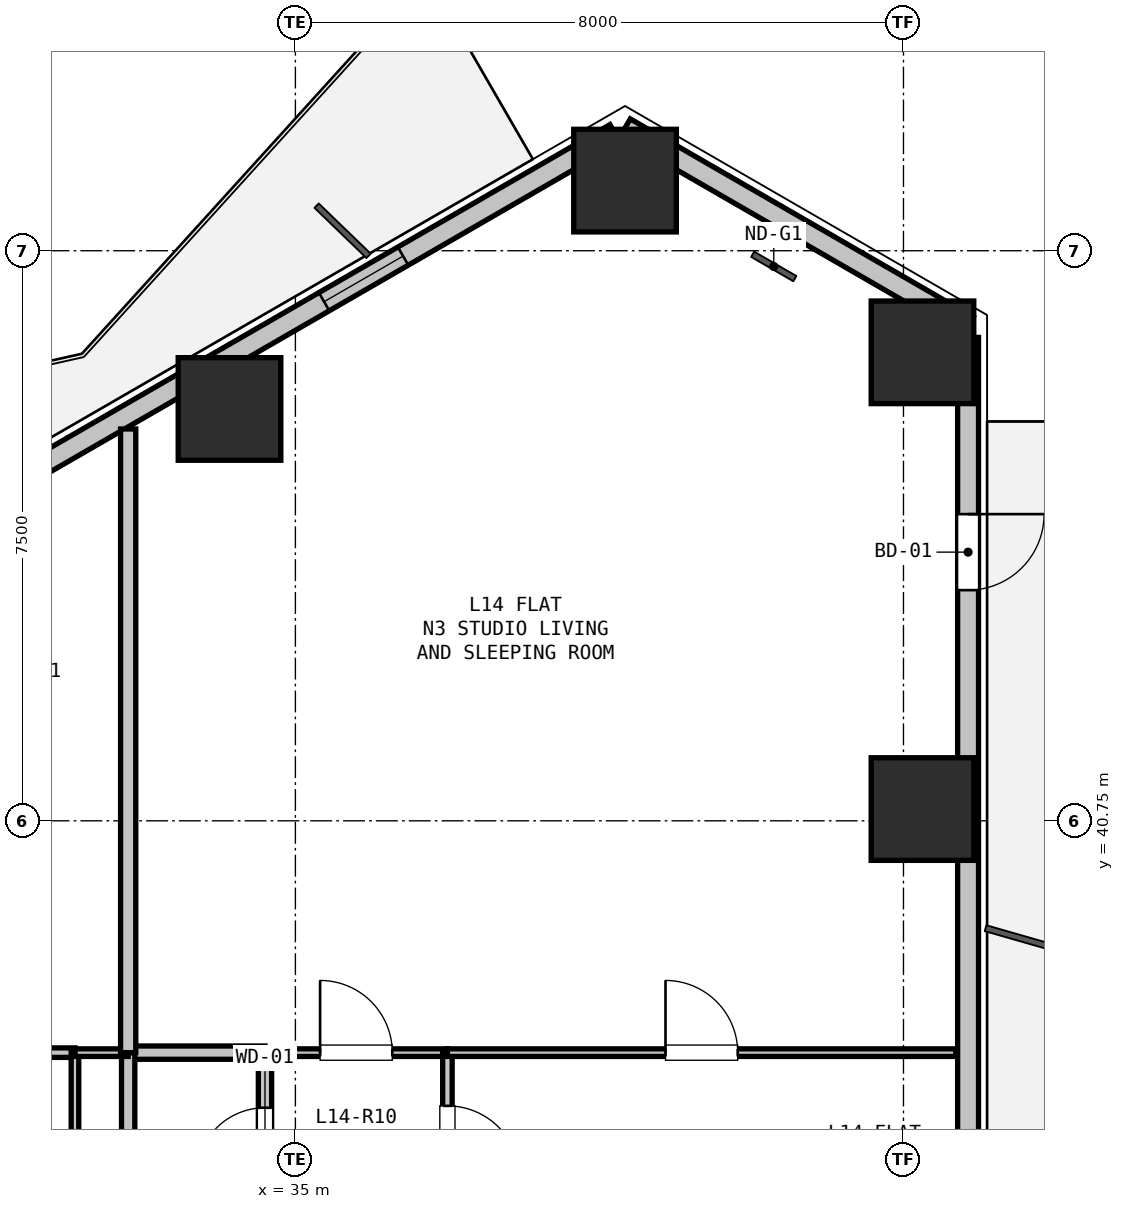
"""IFC4 building model, lengths in metres.
Left out: names, types, materials, properties, quantities, classifications, styles, units other than length and angle.
Written with IfcOpenShell. Run it as: python <this file> out.ifc"""

import sys

from ifc_helpers import new_model, si_unit, direction, frame, frame_2d, origin, origin_2d, place, context, subcontext, project, spatial, rectangle, hollow_rectangle, extrude, element, fill, save


model = new_model("IFC4")
c1 = context("Model", 3, precision=1e-05, world=origin(), true_north=direction((0.0, 1.0)))
c2 = subcontext(c1, "Body", "Model", "MODEL_VIEW")
j1 = project(units=[si_unit("LENGTHUNIT", "METRE"), si_unit("PLANEANGLEUNIT", "RADIAN")], contexts=[c1])
p1 = place(None, origin())
s1 = spatial("IfcSite", under=j1, at=p1, CompositionType="ELEMENT")
p2 = place(p1, origin())
s2 = spatial("IfcBuilding", under=s1, at=p2, CompositionType="ELEMENT")
p3 = place(p2, frame((0.0, 0.0, 52.2)))
s3 = spatial("IfcBuildingStorey", under=s2, at=p3, CompositionType="ELEMENT", Elevation=52.2)
for number, where, z_axis, x_axis in (
    (1, (34.133, 46.168, 0.0), (0.0, 0.0, 1.0), (1.0, 0.0, 0.0)),
    (2, (39.337, 49.173, 0.0), (0.0, 0.0, 1.0), (1.0, 0.0, 0.0)),
    (3, (43.25, 46.913, 0.0), (0.0, 0.0, 1.0), (1.0, 0.0, 0.0)),
    (4, (43.25, 40.905, 0.0), (0.0, 0.0, 1.0), (1.0, 0.0, 0.0)),
):
    element("IfcColumn", number, at=place(p3, frame(where, z_axis=z_axis, x_axis=x_axis)), inside=s3, PredefinedType="COLUMN", context=c2, shape_type="SweptSolid", body=[
        extrude(hollow_rectangle(XDim=1.35, YDim=1.35, WallThickness=0.036, at=origin_2d()), origin(), (0.0, 0.0, 1.0), 3.3),
    ])
p4 = place(p3, frame((39.337, 49.865, 0.0), z_axis=(0.0, 0.0, 1.0), x_axis=(0.866043601342, -0.499968479581, 0.0)))
e5 = element("IfcWall", 5, at=p4, inside=s3, PredefinedType="SOLIDWALL", context=c2, shape_type="SweptSolid", body=[
    extrude(rectangle(XDim=5.211, YDim=0.275, at=frame_2d((2.605, 0.0))), origin(), (0.0, 0.0, 1.0), 2.66),
])
p5 = place(p3, frame((28.232, 43.454, 0.0), z_axis=(0.0, 0.0, 1.0), x_axis=(0.86603192154, 0.499988710747, 0.0)))
e6 = element("IfcWall", 6, at=p5, inside=s3, PredefinedType="SOLIDWALL", context=c2, shape_type="SweptSolid", body=[
    extrude(rectangle(XDim=12.673, YDim=0.275, at=frame_2d((6.336, 0.0))), origin(), (0.0, 0.0, 1.0), 2.66),
])
p6 = place(p5, frame((2.417, 0.0, 0.9)))
e7 = element("IfcOpeningElement", 7, at=p6, cuts=e6, PredefinedType="OPENING", context=c2, shape_type="SweptSolid", body=[
    extrude(rectangle(XDim=1.2, YDim=1.4, at=frame_2d((0.6, 0.7))), frame((0.0, 0.147, 0.0), z_axis=(0.0, -1.0, 0.0), x_axis=(1.0, 0.0, 0.0)), (0.0, 0.0, 1.0), 0.295),
])
p7 = place(p5, frame((8.251, 0.0, 0.9)))
e8 = element("IfcOpeningElement", 8, at=p7, cuts=e6, PredefinedType="OPENING", context=c2, shape_type="SweptSolid", body=[
    extrude(rectangle(XDim=1.2, YDim=1.4, at=frame_2d((0.6, 0.7))), frame((0.0, 0.147, 0.0), z_axis=(0.0, -1.0, 0.0), x_axis=(1.0, 0.0, 0.0)), (0.0, 0.0, 1.0), 0.295),
])
p8 = place(p3, frame((43.85, 47.11, 0.0), z_axis=(0.0, 0.0, 1.0), x_axis=(0.0, -1.0, 0.0)))
e9 = element("IfcWall", 9, at=p8, inside=s3, PredefinedType="SOLIDWALL", context=c2, shape_type="SweptSolid", body=[
    extrude(rectangle(XDim=12.673, YDim=0.275, at=frame_2d((6.336, 0.0))), origin(), (0.0, 0.0, 1.0), 2.66),
])
p9 = place(p8, frame((2.325, 0.0, 0.0)))
e10 = element("IfcOpeningElement", 10, at=p9, cuts=e9, PredefinedType="OPENING", context=c2, shape_type="SweptSolid", body=[
    extrude(rectangle(XDim=1.0, YDim=2.1, at=frame_2d((0.5, 1.05))), frame((0.0, 0.147, 0.0), z_axis=(0.0, -1.0, 0.0), x_axis=(1.0, 0.0, 0.0)), (0.0, 0.0, 1.0), 0.295),
])
p10 = place(p3, frame((34.6, 37.7, 0.0), z_axis=(0.0, 0.0, 1.0), x_axis=(1.0, 0.0, 0.0)))
e11 = element("IfcWall", 11, at=p10, inside=s3, PredefinedType="PARTITIONING", context=c2, shape_type="SweptSolid", body=[
    extrude(rectangle(XDim=2.4, YDim=0.1, at=frame_2d((1.2, 0.0))), origin(), (0.0, 0.0, 1.0), 2.338),
])
p11 = place(p10, frame((0.725, 0.0, 0.0)))
e12 = element("IfcOpeningElement", 12, at=p11, cuts=e11, PredefinedType="OPENING", context=c2, shape_type="SweptSolid", body=[
    extrude(rectangle(XDim=0.95, YDim=2.1, at=frame_2d((0.475, 1.05))), frame((0.0, 0.06, 0.0), z_axis=(0.0, -1.0, 0.0), x_axis=(1.0, 0.0, 0.0)), (0.0, 0.0, 1.0), 0.12),
])
p12 = place(p3, frame((37.0, 37.7, 0.0), z_axis=(0.0, 0.0, 1.0), x_axis=(0.0, -1.0, 0.0)))
e13 = element("IfcWall", 13, at=p12, inside=s3, PredefinedType="PARTITIONING", context=c2, shape_type="SweptSolid", body=[
    extrude(rectangle(XDim=2.35, YDim=0.125, at=frame_2d((1.175, 0.0))), origin(), (0.0, 0.0, 1.0), 2.338),
])
p13 = place(p12, frame((0.7, 0.0, 0.0)))
e14 = element("IfcOpeningElement", 14, at=p13, cuts=e13, PredefinedType="OPENING", context=c2, shape_type="SweptSolid", body=[
    extrude(rectangle(XDim=0.95, YDim=2.1, at=frame_2d((0.475, 1.05))), frame((0.0, 0.073, 0.0), z_axis=(0.0, -1.0, 0.0), x_axis=(1.0, 0.0, 0.0)), (0.0, 0.0, 1.0), 0.145),
])
p14 = place(p3, frame((34.6, 35.35, 0.0), z_axis=(0.0, 0.0, 1.0), x_axis=(0.0, 1.0, 0.0)))
e15 = element("IfcWall", 15, at=p14, inside=s3, PredefinedType="PLUMBINGWALL", context=c2, shape_type="SweptSolid", body=[
    extrude(rectangle(XDim=2.35, YDim=0.175, at=frame_2d((1.175, 0.0))), origin(), (0.0, 0.0, 1.0), 3.04),
])
p15 = place(p14, frame((0.725, 0.0, 0.0)))
e16 = element("IfcOpeningElement", 16, at=p15, cuts=e15, PredefinedType="OPENING", context=c2, shape_type="SweptSolid", body=[
    extrude(rectangle(XDim=0.9, YDim=2.1, at=frame_2d((0.45, 1.05))), frame((0.0, 0.097, 0.0), z_axis=(0.0, -1.0, 0.0), x_axis=(1.0, 0.0, 0.0)), (0.0, 0.0, 1.0), 0.195),
])
p16 = place(p3, frame((29.2, 37.7, 0.0), z_axis=(0.0, 0.0, 1.0), x_axis=(1.0, 0.0, 0.0)))
e17 = element("IfcWall", 17, at=p16, inside=s3, PredefinedType="PARTITIONING", context=c2, shape_type="SweptSolid", body=[
    extrude(rectangle(XDim=2.9, YDim=0.125, at=frame_2d((1.45, 0.0))), origin(), (0.0, 0.0, 1.0), 3.04),
])
p17 = place(p3, frame((32.1, 37.7, 0.0), z_axis=(0.0, 0.0, 1.0), x_axis=(0.0, -1.0, 0.0)))
e18 = element("IfcWall", 18, at=p17, inside=s3, PredefinedType="PARTITIONING", context=c2, shape_type="SweptSolid", body=[
    extrude(rectangle(XDim=2.35, YDim=0.1, at=frame_2d((1.175, 0.0))), origin(), (0.0, 0.0, 1.0), 3.04),
])
p18 = place(p3, frame((32.8, 37.7, 0.0), z_axis=(0.0, 0.0, 1.0), x_axis=(1.0, 0.0, 0.0)))
e19 = element("IfcWall", 19, at=p18, inside=s3, PredefinedType="PLUMBINGWALL", context=c2, shape_type="SweptSolid", body=[
    extrude(rectangle(XDim=1.8, YDim=0.175, at=frame_2d((0.9, 0.0))), origin(), (0.0, 0.0, 1.0), 3.04),
])
p19 = place(p3, frame((32.8, 35.35, 0.0), z_axis=(0.0, 0.0, 1.0), x_axis=(0.0, 1.0, 0.0)))
e20 = element("IfcWall", 20, at=p19, inside=s3, PredefinedType="PLUMBINGWALL", context=c2, shape_type="SweptSolid", body=[
    extrude(rectangle(XDim=2.35, YDim=0.175, at=frame_2d((1.175, 0.0))), origin(), (0.0, 0.0, 1.0), 3.04),
])
p20 = place(p3, frame((37.0, 37.7, 0.0), z_axis=(0.0, 0.0, 1.0), x_axis=(1.0, 0.0, 0.0)))
e21 = element("IfcWall", 21, at=p20, inside=s3, PredefinedType="PARTITIONING", context=c2, shape_type="SweptSolid", body=[
    extrude(rectangle(XDim=6.688, YDim=0.1, at=frame_2d((3.344, 0.0))), origin(), (0.0, 0.0, 1.0), 2.338),
])
p21 = place(p20, frame((2.869, 0.0, 0.0)))
e22 = element("IfcOpeningElement", 22, at=p21, cuts=e21, PredefinedType="OPENING", context=c2, shape_type="SweptSolid", body=[
    extrude(rectangle(XDim=0.95, YDim=2.1, at=frame_2d((0.475, 1.05))), frame((0.0, 0.06, 0.0), z_axis=(0.0, -1.0, 0.0), x_axis=(1.0, 0.0, 0.0)), (0.0, 0.0, 1.0), 0.12),
])
p22 = place(p3, frame((32.8, 37.7, 0.0), z_axis=(0.0, 0.0, 1.0), x_axis=(-1.0, 0.0, 0.0)))
e23 = element("IfcWall", 23, at=p22, inside=s3, PredefinedType="PARTITIONING", context=c2, shape_type="SweptSolid", body=[
    extrude(rectangle(XDim=0.7, YDim=0.1, at=frame_2d((0.35, 0.0))), origin(), (0.0, 0.0, 1.0), 3.04),
])
p23 = place(p3, frame((32.8, 45.905, 0.0), z_axis=(0.0, 0.0, 1.0), x_axis=(0.0, -1.0, 0.0)))
e24 = element("IfcWall", 24, at=p23, inside=s3, PredefinedType="PARTITIONING", context=c2, shape_type="SweptSolid", body=[
    extrude(rectangle(XDim=8.205, YDim=0.2, at=frame_2d((4.103, 0.0))), origin(), (0.0, 0.0, 1.0), 2.365),
])
p24 = place(p7, origin())
e25 = element("IfcWindow", 25, at=p24, inside=s3, PartitioningType="SINGLE_PANEL", PredefinedType="WINDOW", context=c2, shape_type="SweptSolid", body=[
    extrude(rectangle(XDim=1.2, YDim=1.4, at=frame_2d((0.6, 0.7))), frame((0.0, 0.03, 0.0), z_axis=(0.0, -1.0, 0.0), x_axis=(1.0, 0.0, 0.0)), (0.0, 0.0, 1.0), 0.06),
])
fill(e8, e25)
p25 = place(p9, origin())
e26 = element("IfcDoor", 26, at=p25, inside=s3, OperationType="SINGLE_SWING_LEFT", PredefinedType="DOOR", context=c2, shape_type="SweptSolid", body=[
    extrude(rectangle(XDim=1.0, YDim=2.1, at=frame_2d((0.5, 1.05))), frame((0.0, 0.025, 0.0), z_axis=(0.0, -1.0, 0.0), x_axis=(1.0, 0.0, 0.0)), (0.0, 0.0, 1.0), 0.05),
])
fill(e10, e26)
p26 = place(p15, origin())
e27 = element("IfcDoor", 27, at=p26, inside=s3, OperationType="SINGLE_SWING_LEFT", PredefinedType="DOOR", context=c2, shape_type="SweptSolid", body=[
    extrude(rectangle(XDim=0.9, YDim=2.1, at=frame_2d((0.45, 1.05))), frame((0.0, 0.025, 0.0), z_axis=(0.0, -1.0, 0.0), x_axis=(1.0, 0.0, 0.0)), (0.0, 0.0, 1.0), 0.05),
])
fill(e16, e27)
p27 = place(p13, origin())
e28 = element("IfcDoor", 28, at=p27, inside=s3, OperationType="SINGLE_SWING_RIGHT", PredefinedType="DOOR", context=c2, shape_type="SweptSolid", body=[
    extrude(rectangle(XDim=0.95, YDim=2.1, at=frame_2d((0.475, 1.05))), frame((0.0, 0.025, 0.0), z_axis=(0.0, -1.0, 0.0), x_axis=(1.0, 0.0, 0.0)), (0.0, 0.0, 1.0), 0.05),
])
fill(e14, e28)
p28 = place(p11, origin())
e29 = element("IfcDoor", 29, at=p28, inside=s3, OperationType="SINGLE_SWING_LEFT", PredefinedType="DOOR", context=c2, shape_type="SweptSolid", body=[
    extrude(rectangle(XDim=0.95, YDim=2.1, at=frame_2d((0.475, 1.05))), frame((0.0, 0.025, 0.0), z_axis=(0.0, -1.0, 0.0), x_axis=(1.0, 0.0, 0.0)), (0.0, 0.0, 1.0), 0.05),
])
fill(e12, e29)
p29 = place(p21, origin())
e30 = element("IfcDoor", 30, at=p29, inside=s3, OperationType="SINGLE_SWING_LEFT", PredefinedType="DOOR", context=c2, shape_type="SweptSolid", body=[
    extrude(rectangle(XDim=0.95, YDim=2.1, at=frame_2d((0.475, 1.05))), frame((0.0, 0.025, 0.0), z_axis=(0.0, -1.0, 0.0), x_axis=(1.0, 0.0, 0.0)), (0.0, 0.0, 1.0), 0.05),
])
fill(e22, e30)
save(model, sys.argv[1])
